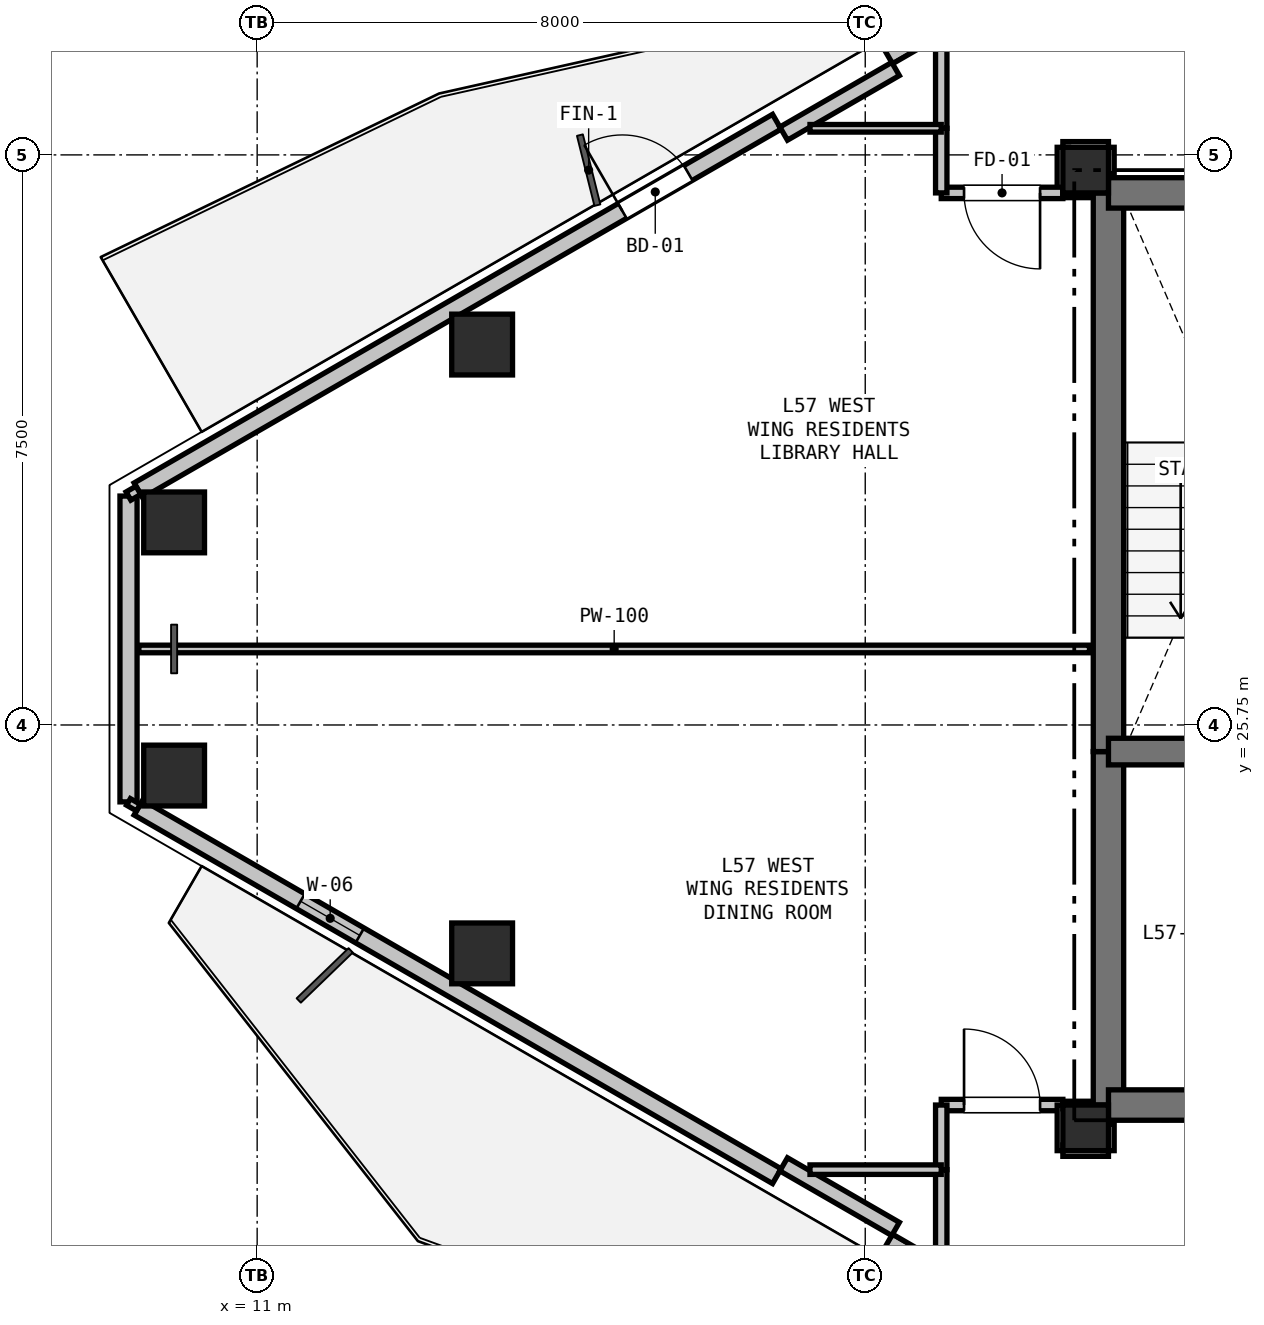
"""IFC4 building model, lengths in metres.
Left out: names, types, materials, properties, quantities, classifications, styles, units other than length and angle.
Written with IfcOpenShell. Run it as: python <this file> out.ifc"""

import sys

from ifc_helpers import new_model, si_unit, direction, frame, frame_2d, origin, origin_2d, place, context, subcontext, project, spatial, rectangle, hollow_rectangle, extrude, element, fill, save


model = new_model("IFC4")
c1 = context("Model", 3, precision=1e-05, world=origin(), true_north=direction((0.0, 1.0)))
c2 = subcontext(c1, "Body", "Model", "MODEL_VIEW")
j1 = project(units=[si_unit("LENGTHUNIT", "METRE"), si_unit("PLANEANGLEUNIT", "RADIAN")], contexts=[c1])
p1 = place(None, origin())
s1 = spatial("IfcSite", under=j1, at=p1, CompositionType="ELEMENT")
p2 = place(p1, origin())
s2 = spatial("IfcBuilding", under=s1, at=p2, CompositionType="ELEMENT")
p3 = place(p2, frame((0.0, 0.0, 205.2)))
s3 = spatial("IfcBuildingStorey", under=s2, at=p3, CompositionType="ELEMENT", Elevation=205.2)
for number, where, z_axis, x_axis in (
    (1, (21.9, 20.45, 0.0), (0.0, 0.0, 1.0), (1.0, 0.0, 0.0)),
    (2, (21.9, 33.05, 0.0), (0.0, 0.0, 1.0), (1.0, 0.0, 0.0)),
):
    element("IfcColumn", number, at=place(p3, frame(where, z_axis=z_axis, x_axis=x_axis)), inside=s3, PredefinedType="COLUMN", context=c2, shape_type="SweptSolid", body=[
        extrude(rectangle(XDim=0.6, YDim=0.6, at=origin_2d()), origin(), (0.0, 0.0, 1.0), 3.3),
    ])
for number, where, z_axis, x_axis in (
    (3, (9.907, 28.415, 0.0), (0.0, 0.0, 1.0), (1.0, 0.0, 0.0)),
    (4, (13.96, 30.755, 0.0), (0.0, 0.0, 1.0), (1.0, 0.0, 0.0)),
    (5, (13.96, 22.745, 0.0), (0.0, 0.0, 1.0), (1.0, 0.0, 0.0)),
    (6, (9.907, 25.085, 0.0), (0.0, 0.0, 1.0), (1.0, 0.0, 0.0)),
):
    element("IfcColumn", number, at=place(p3, frame(where, z_axis=z_axis, x_axis=x_axis)), inside=s3, PredefinedType="COLUMN", context=c2, shape_type="SweptSolid", body=[
        extrude(hollow_rectangle(XDim=0.8, YDim=0.8, WallThickness=0.025, at=origin_2d()), origin(), (0.0, 0.0, 1.0), 3.3),
    ])
p4 = place(p3, frame((9.308, 24.738, 0.0), z_axis=(0.0, 0.0, 1.0), x_axis=(0.0, 1.0, 0.0)))
e7 = element("IfcWall", 7, at=p4, inside=s3, PredefinedType="SOLIDWALL", context=c2, shape_type="SweptSolid", body=[
    extrude(rectangle(XDim=4.023, YDim=0.225, at=frame_2d((2.012, 0.0))), origin(), (0.0, 0.0, 1.0), 2.69),
])
p5 = place(p3, frame((9.438, 28.837, 0.0), z_axis=(0.0, 0.0, 1.0), x_axis=(0.866027133173, 0.499997004599, 0.0)))
e8 = element("IfcWall", 8, at=p5, inside=s3, PredefinedType="SOLIDWALL", context=c2, shape_type="SweptSolid", body=[
    extrude(rectangle(XDim=9.699, YDim=0.225, at=frame_2d((4.849, 0.0))), origin(), (0.0, 0.0, 1.0), 2.69),
])
p6 = place(p5, frame((7.352, 0.0, 0.0)))
e9 = element("IfcOpeningElement", 9, at=p6, cuts=e8, PredefinedType="OPENING", context=c2, shape_type="SweptSolid", body=[
    extrude(rectangle(XDim=1.0, YDim=2.1, at=frame_2d((0.5, 1.05))), frame((0.0, 0.123, 0.0), z_axis=(0.0, -1.0, 0.0), x_axis=(1.0, 0.0, 0.0)), (0.0, 0.0, 1.0), 0.245),
])
p7 = place(p3, frame((19.309, 34.536, 0.0), z_axis=(0.0, 0.0, 1.0), x_axis=(0.866020680503, 0.500008180874, 0.0)))
e10 = element("IfcWall", 10, at=p7, inside=s3, PredefinedType="PARAPET", context=c2, shape_type="SweptSolid", body=[
    extrude(rectangle(XDim=8.999, YDim=0.2, at=frame_2d((4.5, 0.0))), origin(), (0.0, 0.0, 1.0), 0.2),
])
p8 = place(p3, frame((17.927, 33.53, 0.0), z_axis=(0.0, 0.0, 1.0), x_axis=(0.86605165483, 0.499954529098, 0.0)))
e11 = element("IfcWall", 11, at=p8, inside=s3, PredefinedType="PARAPET", context=c2, shape_type="SweptSolid", body=[
    extrude(rectangle(XDim=1.7, YDim=0.2, at=frame_2d((0.85, 0.0))), origin(), (0.0, 0.0, 1.0), 2.69),
])
p9 = place(p3, frame((27.102, 14.464, 0.0), z_axis=(0.0, 0.0, 1.0), x_axis=(-0.866020680503, 0.500008180874, 0.0)))
e12 = element("IfcWall", 12, at=p9, inside=s3, PredefinedType="PARAPET", context=c2, shape_type="SweptSolid", body=[
    extrude(rectangle(XDim=8.999, YDim=0.2, at=frame_2d((4.5, 0.0))), origin(), (0.0, 0.0, 1.0), 0.2),
])
p10 = place(p3, frame((17.837, 19.814, 0.0), z_axis=(0.0, 0.0, 1.0), x_axis=(-0.866027133173, 0.499997004599, 0.0)))
e13 = element("IfcWall", 13, at=p10, inside=s3, PredefinedType="SOLIDWALL", context=c2, shape_type="SweptSolid", body=[
    extrude(rectangle(XDim=9.699, YDim=0.225, at=frame_2d((4.849, 0.0))), origin(), (0.0, 0.0, 1.0), 2.69),
])
p11 = place(p10, frame((6.335, 0.0, 0.9)))
e14 = element("IfcOpeningElement", 14, at=p11, cuts=e13, PredefinedType="OPENING", context=c2, shape_type="SweptSolid", body=[
    extrude(rectangle(XDim=0.9, YDim=1.4, at=frame_2d((0.45, 0.7))), frame((0.0, 0.123, 0.0), z_axis=(0.0, -1.0, 0.0), x_axis=(1.0, 0.0, 0.0)), (0.0, 0.0, 1.0), 0.245),
])
p12 = place(p3, frame((19.399, 19.12, 0.0), z_axis=(0.0, 0.0, 1.0), x_axis=(-0.86605165483, 0.499954529098, 0.0)))
e15 = element("IfcWall", 15, at=p12, inside=s3, PredefinedType="PARAPET", context=c2, shape_type="SweptSolid", body=[
    extrude(rectangle(XDim=1.7, YDim=0.2, at=frame_2d((0.85, 0.0))), origin(), (0.0, 0.0, 1.0), 2.69),
])
p13 = place(p3, frame((22.2, 20.75, 0.0), z_axis=(0.0, 0.0, 1.0), x_axis=(0.0, 1.0, 0.0)))
e16 = element("IfcWall", 16, at=p13, inside=s3, PredefinedType="SHEAR", context=c2, shape_type="SweptSolid", body=[
    extrude(rectangle(XDim=4.65, YDim=0.4, at=frame_2d((2.325, 0.0))), origin(), (0.0, 0.0, 1.0), 3.07),
])
p14 = place(p3, frame((22.2, 25.4, 0.0), z_axis=(0.0, 0.0, 1.0), x_axis=(0.0, 1.0, 0.0)))
e17 = element("IfcWall", 17, at=p14, inside=s3, PredefinedType="SHEAR", context=c2, shape_type="SweptSolid", body=[
    extrude(rectangle(XDim=7.35, YDim=0.4, at=frame_2d((3.675, 0.0))), origin(), (0.0, 0.0, 1.0), 3.07),
])
p15 = place(p3, frame((22.2, 32.75, 0.0), z_axis=(0.0, 0.0, 1.0), x_axis=(1.0, 0.0, 0.0)))
e18 = element("IfcWall", 18, at=p15, inside=s3, PredefinedType="SHEAR", context=c2, shape_type="SweptSolid", body=[
    extrude(rectangle(XDim=3.45, YDim=0.4, at=frame_2d((1.725, 0.0))), origin(), (0.0, 0.0, 1.0), 3.07),
])
p16 = place(p3, frame((25.65, 20.75, 0.0), z_axis=(0.0, 0.0, 1.0), x_axis=(-1.0, 0.0, 0.0)))
e19 = element("IfcWall", 19, at=p16, inside=s3, PredefinedType="SHEAR", context=c2, shape_type="SweptSolid", body=[
    extrude(rectangle(XDim=3.45, YDim=0.4, at=frame_2d((1.725, 0.0))), origin(), (0.0, 0.0, 1.0), 3.07),
])
p17 = place(p16, frame((0.65, 0.0, 0.0)))
e20 = element("IfcOpeningElement", 20, at=p17, cuts=e19, PredefinedType="OPENING", context=c2, shape_type="SweptSolid", body=[
    extrude(rectangle(XDim=1.15, YDim=2.15, at=frame_2d((0.575, 1.075))), frame((0.0, 0.21, 0.0), z_axis=(0.0, -1.0, 0.0), x_axis=(1.0, 0.0, 0.0)), (0.0, 0.0, 1.0), 0.42),
])
p18 = place(p3, frame((22.2, 25.4, 0.0), z_axis=(0.0, 0.0, 1.0), x_axis=(1.0, 0.0, 0.0)))
e21 = element("IfcWall", 21, at=p18, inside=s3, PredefinedType="SHEAR", context=c2, shape_type="SweptSolid", body=[
    extrude(rectangle(XDim=3.45, YDim=0.35, at=frame_2d((1.725, 0.0))), origin(), (0.0, 0.0, 1.0), 3.07),
])
p19 = place(p18, frame((1.15, 0.0, 0.0)))
e22 = element("IfcOpeningElement", 22, at=p19, cuts=e21, PredefinedType="OPENING", context=c2, shape_type="SweptSolid", body=[
    extrude(rectangle(XDim=1.15, YDim=2.15, at=frame_2d((0.575, 1.075))), frame((0.0, 0.185, 0.0), z_axis=(0.0, -1.0, 0.0), x_axis=(1.0, 0.0, 0.0)), (0.0, 0.0, 1.0), 0.37),
])
p20 = place(p3, frame((22.2, 33.0, 0.0), z_axis=(0.0, 0.0, 1.0), x_axis=(0.0, 1.0, 0.0)))
e23 = element("IfcWall", 23, at=p20, inside=s3, PredefinedType="PARTITIONING", context=c2, shape_type="SweptSolid", body=[
    extrude(rectangle(XDim=0.35, YDim=0.15, at=frame_2d((0.175, 0.0))), origin(), (0.0, 0.0, 1.0), 2.595),
])
p21 = place(p3, frame((22.2, 33.35, 0.0), z_axis=(0.0, 0.0, 1.0), x_axis=(-1.0, 0.0, 0.0)))
e24 = element("IfcWall", 24, at=p21, inside=s3, PredefinedType="PARTITIONING", context=c2, shape_type="SweptSolid", body=[
    extrude(rectangle(XDim=0.6, YDim=0.15, at=frame_2d((0.3, 0.0))), origin(), (0.0, 0.0, 1.0), 3.07),
])
p22 = place(p3, frame((21.6, 33.35, 0.0), z_axis=(0.0, 0.0, 1.0), x_axis=(0.0, -1.0, 0.0)))
e25 = element("IfcWall", 25, at=p22, inside=s3, PredefinedType="PARTITIONING", context=c2, shape_type="SweptSolid", body=[
    extrude(rectangle(XDim=0.6, YDim=0.15, at=frame_2d((0.3, 0.0))), origin(), (0.0, 0.0, 1.0), 2.518),
])
p23 = place(p3, frame((21.6, 32.75, 0.0), z_axis=(0.0, 0.0, 1.0), x_axis=(-1.0, 0.0, 0.0)))
e26 = element("IfcWall", 26, at=p23, inside=s3, PredefinedType="PARTITIONING", context=c2, shape_type="SweptSolid", body=[
    extrude(rectangle(XDim=1.6, YDim=0.15, at=frame_2d((0.8, 0.0))), origin(), (0.0, 0.0, 1.0), 2.518),
])
p24 = place(p23, frame((0.3, 0.0, 0.0)))
e27 = element("IfcOpeningElement", 27, at=p24, cuts=e26, PredefinedType="OPENING", context=c2, shape_type="SweptSolid", body=[
    extrude(rectangle(XDim=1.0, YDim=2.15, at=frame_2d((0.5, 1.075))), frame((0.0, 0.085, 0.0), z_axis=(0.0, -1.0, 0.0), x_axis=(1.0, 0.0, 0.0)), (0.0, 0.0, 1.0), 0.17),
])
p25 = place(p3, frame((20.0, 32.75, 0.0), z_axis=(0.0, 0.0, 1.0), x_axis=(0.0, 1.0, 0.0)))
e28 = element("IfcWall", 28, at=p25, inside=s3, PredefinedType="PARTITIONING", context=c2, shape_type="SweptSolid", body=[
    extrude(rectangle(XDim=0.85, YDim=0.15, at=frame_2d((0.425, 0.0))), origin(), (0.0, 0.0, 1.0), 3.07),
])
p26 = place(p3, frame((20.0, 33.6, 0.0), z_axis=(0.0, 0.0, 1.0), x_axis=(0.0, 1.0, 0.0)))
e29 = element("IfcWall", 29, at=p26, inside=s3, PredefinedType="PARTITIONING", context=c2, shape_type="SweptSolid", body=[
    extrude(rectangle(XDim=1.291, YDim=0.15, at=frame_2d((0.646, 0.0))), origin(), (0.0, 0.0, 1.0), 2.365),
])
p27 = place(p3, frame((20.0, 20.75, 0.0), z_axis=(0.0, 0.0, 1.0), x_axis=(1.0, 0.0, 0.0)))
e30 = element("IfcWall", 30, at=p27, inside=s3, PredefinedType="PARTITIONING", context=c2, shape_type="SweptSolid", body=[
    extrude(rectangle(XDim=1.6, YDim=0.15, at=frame_2d((0.8, 0.0))), origin(), (0.0, 0.0, 1.0), 2.518),
])
p28 = place(p27, frame((0.3, 0.0, 0.0)))
e31 = element("IfcOpeningElement", 31, at=p28, cuts=e30, PredefinedType="OPENING", context=c2, shape_type="SweptSolid", body=[
    extrude(rectangle(XDim=1.0, YDim=2.15, at=frame_2d((0.5, 1.075))), frame((0.0, 0.085, 0.0), z_axis=(0.0, -1.0, 0.0), x_axis=(1.0, 0.0, 0.0)), (0.0, 0.0, 1.0), 0.17),
])
p29 = place(p3, frame((21.6, 20.75, 0.0), z_axis=(0.0, 0.0, 1.0), x_axis=(0.0, -1.0, 0.0)))
e32 = element("IfcWall", 32, at=p29, inside=s3, PredefinedType="PARTITIONING", context=c2, shape_type="SweptSolid", body=[
    extrude(rectangle(XDim=0.6, YDim=0.15, at=frame_2d((0.3, 0.0))), origin(), (0.0, 0.0, 1.0), 2.518),
])
p30 = place(p3, frame((21.6, 20.15, 0.0), z_axis=(0.0, 0.0, 1.0), x_axis=(1.0, 0.0, 0.0)))
e33 = element("IfcWall", 33, at=p30, inside=s3, PredefinedType="PARTITIONING", context=c2, shape_type="SweptSolid", body=[
    extrude(rectangle(XDim=0.6, YDim=0.15, at=frame_2d((0.3, 0.0))), origin(), (0.0, 0.0, 1.0), 2.518),
])
p31 = place(p3, frame((22.2, 20.15, 0.0), z_axis=(0.0, 0.0, 1.0), x_axis=(0.0, 1.0, 0.0)))
e34 = element("IfcWall", 34, at=p31, inside=s3, PredefinedType="PARTITIONING", context=c2, shape_type="SweptSolid", body=[
    extrude(rectangle(XDim=0.35, YDim=0.15, at=frame_2d((0.175, 0.0))), origin(), (0.0, 0.0, 1.0), 2.518),
])
p32 = place(p3, frame((20.0, 18.609, 0.0), z_axis=(0.0, 0.0, 1.0), x_axis=(0.0, 1.0, 0.0)))
e35 = element("IfcWall", 35, at=p32, inside=s3, PredefinedType="PARTITIONING", context=c2, shape_type="SweptSolid", body=[
    extrude(rectangle(XDim=1.291, YDim=0.15, at=frame_2d((0.646, 0.0))), origin(), (0.0, 0.0, 1.0), 2.365),
])
p33 = place(p3, frame((20.0, 19.9, 0.0), z_axis=(0.0, 0.0, 1.0), x_axis=(0.0, 1.0, 0.0)))
e36 = element("IfcWall", 36, at=p33, inside=s3, PredefinedType="PARTITIONING", context=c2, shape_type="SweptSolid", body=[
    extrude(rectangle(XDim=0.85, YDim=0.15, at=frame_2d((0.425, 0.0))), origin(), (0.0, 0.0, 1.0), 3.07),
])
p34 = place(p3, frame((18.273, 33.6, 0.0), z_axis=(0.0, 0.0, 1.0), x_axis=(1.0, 0.0, 0.0)))
e37 = element("IfcWall", 37, at=p34, inside=s3, PredefinedType="PARTITIONING", context=c2, shape_type="SweptSolid", body=[
    extrude(rectangle(XDim=1.727, YDim=0.1, at=frame_2d((0.863, 0.0))), origin(), (0.0, 0.0, 1.0), 2.365),
])
p35 = place(p3, frame((21.6, 32.75, 0.0), z_axis=(0.0, 0.0, 1.0), x_axis=(1.0, 0.0, 0.0)))
e38 = element("IfcWall", 38, at=p35, inside=s3, PredefinedType="PARTITIONING", context=c2, shape_type="SweptSolid", body=[
    extrude(rectangle(XDim=0.35, YDim=0.125, at=frame_2d((0.175, 0.0))), origin(), (0.0, 0.0, 1.0), 2.595),
])
p36 = place(p3, frame((21.95, 26.75, 0.0), z_axis=(0.0, 0.0, 1.0), x_axis=(-1.0, 0.0, 0.0)))
e39 = element("IfcWall", 39, at=p36, inside=s3, PredefinedType="PARTITIONING", context=c2, shape_type="SweptSolid", body=[
    extrude(rectangle(XDim=12.506, YDim=0.1, at=frame_2d((6.253, 0.0))), origin(), (0.0, 0.0, 1.0), 2.595),
])
p37 = place(p3, frame((9.307, 28.762, 0.0), z_axis=(0.0, 0.0, 1.0), x_axis=(0.866239593359, 0.499628829129, 0.0)))
e40 = element("IfcWall", 40, at=p37, inside=s3, PredefinedType="PARTITIONING", context=c2, shape_type="SweptSolid", body=[
    extrude(rectangle(XDim=0.15, YDim=0.125, at=frame_2d((0.075, 0.0))), origin(), (0.0, 0.0, 1.0), 3.07),
])
p38 = place(p3, frame((21.95, 20.75, 0.0), z_axis=(0.0, 0.0, 1.0), x_axis=(-1.0, 0.0, 0.0)))
e41 = element("IfcWall", 41, at=p38, inside=s3, PredefinedType="PARTITIONING", context=c2, shape_type="SweptSolid", body=[
    extrude(rectangle(XDim=0.35, YDim=0.1, at=frame_2d((0.175, 0.0))), origin(), (0.0, 0.0, 1.0), 2.595),
])
p39 = place(p3, frame((20.0, 19.9, 0.0), z_axis=(0.0, 0.0, 1.0), x_axis=(-1.0, 0.0, 0.0)))
e42 = element("IfcWall", 42, at=p39, inside=s3, PredefinedType="PARTITIONING", context=c2, shape_type="SweptSolid", body=[
    extrude(rectangle(XDim=1.727, YDim=0.125, at=frame_2d((0.863, 0.0))), origin(), (0.0, 0.0, 1.0), 2.365),
])
p40 = place(p3, frame((9.437, 24.663, 0.0), z_axis=(0.0, 0.0, 1.0), x_axis=(-0.866239593359, 0.499628829129, 0.0)))
e43 = element("IfcWall", 43, at=p40, inside=s3, PredefinedType="PARTITIONING", context=c2, shape_type="SweptSolid", body=[
    extrude(rectangle(XDim=0.15, YDim=0.1, at=frame_2d((0.075, 0.0))), origin(), (0.0, 0.0, 1.0), 3.07),
])
p41 = place(p6, origin())
e44 = element("IfcDoor", 44, at=p41, inside=s3, OperationType="SINGLE_SWING_LEFT", PredefinedType="DOOR", context=c2, shape_type="SweptSolid", body=[
    extrude(rectangle(XDim=1.0, YDim=2.1, at=frame_2d((0.5, 1.05))), frame((0.0, 0.025, 0.0), z_axis=(0.0, -1.0, 0.0), x_axis=(1.0, 0.0, 0.0)), (0.0, 0.0, 1.0), 0.05),
])
fill(e9, e44)
p42 = place(p11, origin())
e45 = element("IfcWindow", 45, at=p42, inside=s3, PartitioningType="SINGLE_PANEL", PredefinedType="WINDOW", context=c2, shape_type="SweptSolid", body=[
    extrude(rectangle(XDim=0.9, YDim=1.4, at=frame_2d((0.45, 0.7))), frame((0.0, 0.03, 0.0), z_axis=(0.0, -1.0, 0.0), x_axis=(1.0, 0.0, 0.0)), (0.0, 0.0, 1.0), 0.06),
])
fill(e14, e45)
p43 = place(p24, origin())
e46 = element("IfcDoor", 46, at=p43, inside=s3, OperationType="SINGLE_SWING_LEFT", PredefinedType="DOOR", context=c2, shape_type="SweptSolid", body=[
    extrude(rectangle(XDim=1.0, YDim=2.15, at=frame_2d((0.5, 1.075))), frame((0.0, 0.025, 0.0), z_axis=(0.0, -1.0, 0.0), x_axis=(1.0, 0.0, 0.0)), (0.0, 0.0, 1.0), 0.05),
])
fill(e27, e46)
p44 = place(p28, origin())
e47 = element("IfcDoor", 47, at=p44, inside=s3, OperationType="SINGLE_SWING_LEFT", PredefinedType="DOOR", context=c2, shape_type="SweptSolid", body=[
    extrude(rectangle(XDim=1.0, YDim=2.15, at=frame_2d((0.5, 1.075))), frame((0.0, 0.025, 0.0), z_axis=(0.0, -1.0, 0.0), x_axis=(1.0, 0.0, 0.0)), (0.0, 0.0, 1.0), 0.05),
])
fill(e31, e47)
save(model, sys.argv[1])
